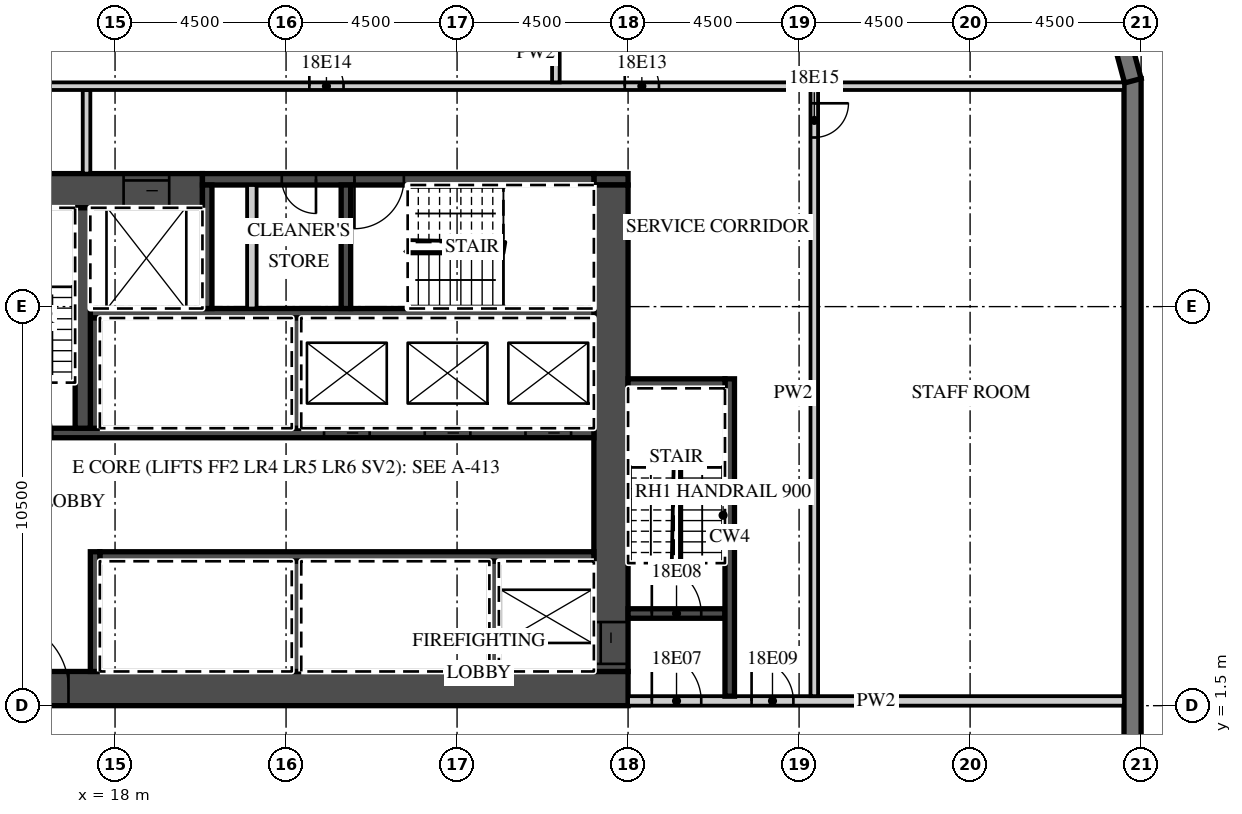
"""IFC4 building model, lengths in metres.
Left out: names, types, materials, properties, quantities, classifications, styles, units other than length and angle.
Written with IfcOpenShell. Run it as: python <this file> out.ifc"""

import sys

from ifc_helpers import new_model, si_unit, direction, frame, frame_2d, origin, place, context, subcontext, project, spatial, polyline, rectangle, outline, extrude, element, fill, save


model = new_model("IFC4")
c1 = context("Model", 3, precision=1e-05, world=origin(), true_north=direction((0.0, 1.0)))
c2 = subcontext(c1, "Body", "Model", "MODEL_VIEW")
j1 = project(units=[si_unit("LENGTHUNIT", "METRE"), si_unit("PLANEANGLEUNIT", "RADIAN")], contexts=[c1])
p1 = place(None, origin())
s1 = spatial("IfcSite", under=j1, at=p1, CompositionType="ELEMENT")
p2 = place(p1, origin())
s2 = spatial("IfcBuilding", under=s1, at=p2, CompositionType="ELEMENT")
p3 = place(p2, frame((0.0, 0.0, 89.7)))
s3 = spatial("IfcBuildingStorey", under=s2, at=p3, CompositionType="ELEMENT", Elevation=89.7)
p4 = place(p3, frame((44.775, -18.0, 0.0), z_axis=(0.0, 0.0, 1.0), x_axis=(0.0, 1.0, 0.0)))
e1 = element("IfcWall", 1, at=p4, inside=s3, PredefinedType="SOLIDWALL", context=c2, shape_type="SweptSolid", body=[
    extrude(rectangle(XDim=36.0, YDim=0.45, at=frame_2d((18.0, 0.0))), origin(), (0.0, 0.0, 1.0), 3.02),
])
p5 = place(p4, frame((3.9, 0.0, 0.45)))
e2 = element("IfcOpeningElement", 2, at=p5, cuts=e1, PredefinedType="OPENING", context=c2, shape_type="SweptSolid", body=[
    extrude(rectangle(XDim=3.3, YDim=2.25, at=frame_2d((1.65, 1.125))), frame((0.0, 0.235, 0.0), z_axis=(0.0, -1.0, 0.0), x_axis=(1.0, 0.0, 0.0)), (0.0, 0.0, 1.0), 0.47),
])
p6 = place(p4, frame((8.4, 0.0, 0.45)))
e3 = element("IfcOpeningElement", 3, at=p6, cuts=e1, PredefinedType="OPENING", context=c2, shape_type="SweptSolid", body=[
    extrude(rectangle(XDim=3.3, YDim=2.25, at=frame_2d((1.65, 1.125))), frame((0.0, 0.235, 0.0), z_axis=(0.0, -1.0, 0.0), x_axis=(1.0, 0.0, 0.0)), (0.0, 0.0, 1.0), 0.47),
])
p7 = place(p4, frame((12.9, 0.0, 0.45)))
e4 = element("IfcOpeningElement", 4, at=p7, cuts=e1, PredefinedType="OPENING", context=c2, shape_type="SweptSolid", body=[
    extrude(rectangle(XDim=3.3, YDim=2.25, at=frame_2d((1.65, 1.125))), frame((0.0, 0.235, 0.0), z_axis=(0.0, -1.0, 0.0), x_axis=(1.0, 0.0, 0.0)), (0.0, 0.0, 1.0), 0.47),
])
p8 = place(p3, frame((44.783, 17.942, 0.0), z_axis=(0.0, 0.0, 1.0), x_axis=(-0.25881466832, 0.965926999034, 0.0)))
e5 = element("IfcWall", 5, at=p8, inside=s3, PredefinedType="SOLIDWALL", context=c2, shape_type="SweptSolid", body=[
    extrude(outline(polyline([(0.0, -0.225), (2.071, -0.225), (1.95, 0.225), (0.121, 0.225), (0.0, -0.225)])), origin(), (0.0, 0.0, 1.0), 3.02),
])
p9 = place(p3, frame((13.5, 1.95, 0.0), z_axis=(0.0, 0.0, 1.0), x_axis=(1.0, 0.0, 0.0)))
e6 = element("IfcWall", 6, at=p9, inside=s3, PredefinedType="SHEAR", context=c2, shape_type="SweptSolid", body=[
    extrude(rectangle(XDim=18.0, YDim=0.9, at=frame_2d((9.0, 0.0))), origin(), (0.0, 0.0, 1.0), 3.02),
])
p10 = place(p9, frame((1.475, 0.0, 0.0)))
e7 = element("IfcOpeningElement", 7, at=p10, cuts=e6, PredefinedType="OPENING", context=c2, shape_type="SweptSolid", body=[
    extrude(rectangle(XDim=1.8, YDim=2.1, at=frame_2d((0.9, 1.05))), frame((0.0, 0.46, 0.0), z_axis=(0.0, -1.0, 0.0), x_axis=(1.0, 0.0, 0.0)), (0.0, 0.0, 1.0), 0.92),
])
p11 = place(p3, frame((13.5, 15.05, 0.0), z_axis=(0.0, 0.0, 1.0), x_axis=(1.0, 0.0, 0.0)))
e8 = element("IfcWall", 8, at=p11, inside=s3, PredefinedType="SHEAR", context=c2, shape_type="SweptSolid", body=[
    extrude(rectangle(XDim=6.8, YDim=0.9, at=frame_2d((3.4, 0.0))), origin(), (0.0, 0.0, 1.0), 3.02),
])
p12 = place(p11, frame((4.725, 0.0, 0.0)))
e9 = element("IfcOpeningElement", 9, at=p12, cuts=e8, PredefinedType="OPENING", context=c2, shape_type="SweptSolid", body=[
    extrude(rectangle(XDim=1.2, YDim=2.1, at=frame_2d((0.6, 1.05))), frame((0.0, 0.46, 0.0), z_axis=(0.0, -1.0, 0.0), x_axis=(1.0, 0.0, 0.0)), (0.0, 0.0, 1.0), 0.92),
])
p13 = place(p3, frame((30.6, 15.35, 0.0), z_axis=(0.0, 0.0, 1.0), x_axis=(1.0, 0.0, 0.0)))
e10 = element("IfcWall", 10, at=p13, inside=s3, PredefinedType="SHEAR", context=c2, shape_type="SweptSolid", body=[
    extrude(rectangle(XDim=0.9, YDim=0.3, at=frame_2d((0.45, 0.0))), origin(), (0.0, 0.0, 1.0), 3.02),
])
p14 = place(p3, frame((20.3, 15.35, 0.0), z_axis=(0.0, 0.0, 1.0), x_axis=(1.0, 0.0, 0.0)))
e11 = element("IfcWall", 11, at=p14, inside=s3, PredefinedType="SHEAR", context=c2, shape_type="SweptSolid", body=[
    extrude(rectangle(XDim=10.3, YDim=0.3, at=frame_2d((5.15, 0.0))), origin(), (0.0, 0.0, 1.0), 3.02),
])
p15 = place(p14, frame((4.0, 0.0, 0.0)))
e12 = element("IfcOpeningElement", 12, at=p15, cuts=e11, PredefinedType="OPENING", context=c2, shape_type="SweptSolid", body=[
    extrude(rectangle(XDim=1.3, YDim=2.1, at=frame_2d((0.65, 1.05))), frame((0.0, 0.16, 0.0), z_axis=(0.0, -1.0, 0.0), x_axis=(1.0, 0.0, 0.0)), (0.0, 0.0, 1.0), 0.32),
])
p16 = place(p14, frame((2.087, 0.0, 0.0)))
e13 = element("IfcOpeningElement", 13, at=p16, cuts=e11, PredefinedType="OPENING", context=c2, shape_type="SweptSolid", body=[
    extrude(rectangle(XDim=0.9, YDim=2.1, at=frame_2d((0.45, 1.05))), frame((0.0, 0.16, 0.0), z_axis=(0.0, -1.0, 0.0), x_axis=(1.0, 0.0, 0.0)), (0.0, 0.0, 1.0), 0.32),
])
p17 = place(p3, frame((31.05, 2.4, 0.0), z_axis=(0.0, 0.0, 1.0), x_axis=(0.0, 1.0, 0.0)))
e14 = element("IfcWall", 14, at=p17, inside=s3, PredefinedType="SHEAR", context=c2, shape_type="SweptSolid", body=[
    extrude(rectangle(XDim=12.8, YDim=0.9, at=frame_2d((6.4, 0.0))), origin(), (0.0, 0.0, 1.0), 3.02),
])
p18 = place(p17, frame((0.2, 0.0, 0.0)))
e15 = element("IfcOpeningElement", 15, at=p18, cuts=e14, PredefinedType="OPENING", context=c2, shape_type="SweptSolid", body=[
    extrude(rectangle(XDim=1.1, YDim=2.1, at=frame_2d((0.55, 1.05))), frame((0.0, 0.46, 0.0), z_axis=(0.0, -1.0, 0.0), x_axis=(1.0, 0.0, 0.0)), (0.0, 0.0, 1.0), 0.92),
])
p19 = place(p3, frame((17.6, 5.425, 0.0), z_axis=(0.0, 0.0, 1.0), x_axis=(1.0, 0.0, 0.0)))
e16 = element("IfcWall", 16, at=p19, inside=s3, PredefinedType="SHEAR", context=c2, shape_type="SweptSolid", body=[
    extrude(rectangle(XDim=13.0, YDim=0.25, at=frame_2d((6.5, 0.0))), origin(), (0.0, 0.0, 1.0), 3.02),
])
p20 = place(p3, frame((17.475, 2.4, 0.0), z_axis=(0.0, 0.0, 1.0), x_axis=(0.0, 1.0, 0.0)))
e17 = element("IfcWall", 17, at=p20, inside=s3, PredefinedType="SHEAR", context=c2, shape_type="SweptSolid", body=[
    extrude(rectangle(XDim=3.15, YDim=0.25, at=frame_2d((1.575, 0.0))), origin(), (0.0, 0.0, 1.0), 3.02),
])
for number, where, z_axis, x_axis in (
    (18, (27.975, 2.4, 0.0), (0.0, 0.0, 1.0), (0.0, 1.0, 0.0)),
    (19, (22.775, 2.4, 0.0), (0.0, 0.0, 1.0), (0.0, 1.0, 0.0)),
):
    element("IfcWall", number, at=place(p3, frame(where, z_axis=z_axis, x_axis=x_axis)), inside=s3, PredefinedType="SHEAR", context=c2, shape_type="SweptSolid", body=[
        extrude(rectangle(XDim=2.9, YDim=0.25, at=frame_2d((1.45, 0.0))), origin(), (0.0, 0.0, 1.0), 3.02),
    ])
p21 = place(p3, frame((14.4, 8.675, 0.0), z_axis=(0.0, 0.0, 1.0), x_axis=(1.0, 0.0, 0.0)))
e20 = element("IfcWall", 20, at=p21, inside=s3, PredefinedType="SHEAR", context=c2, shape_type="SweptSolid", body=[
    extrude(rectangle(XDim=16.2, YDim=0.25, at=frame_2d((8.1, 0.0))), origin(), (0.0, 0.0, 1.0), 3.02),
])
p22 = place(p21, frame((14.4, 0.0, 0.0)))
e21 = element("IfcOpeningElement", 21, at=p22, cuts=e20, PredefinedType="OPENING", context=c2, shape_type="SweptSolid", body=[
    extrude(rectangle(XDim=1.2, YDim=2.1, at=frame_2d((0.6, 1.05))), frame((0.0, 0.135, 0.0), z_axis=(0.0, -1.0, 0.0), x_axis=(1.0, 0.0, 0.0)), (0.0, 0.0, 1.0), 0.27),
])
p23 = place(p21, frame((11.75, 0.0, 0.0)))
e22 = element("IfcOpeningElement", 22, at=p23, cuts=e20, PredefinedType="OPENING", context=c2, shape_type="SweptSolid", body=[
    extrude(rectangle(XDim=1.2, YDim=2.1, at=frame_2d((0.6, 1.05))), frame((0.0, 0.135, 0.0), z_axis=(0.0, -1.0, 0.0), x_axis=(1.0, 0.0, 0.0)), (0.0, 0.0, 1.0), 0.27),
])
p24 = place(p21, frame((9.1, 0.0, 0.0)))
e23 = element("IfcOpeningElement", 23, at=p24, cuts=e20, PredefinedType="OPENING", context=c2, shape_type="SweptSolid", body=[
    extrude(rectangle(XDim=1.2, YDim=2.1, at=frame_2d((0.6, 1.05))), frame((0.0, 0.135, 0.0), z_axis=(0.0, -1.0, 0.0), x_axis=(1.0, 0.0, 0.0)), (0.0, 0.0, 1.0), 0.27),
])
p25 = place(p21, frame((0.65, 0.0, 0.0)))
e24 = element("IfcOpeningElement", 24, at=p25, cuts=e20, PredefinedType="OPENING", context=c2, shape_type="SweptSolid", body=[
    extrude(rectangle(XDim=1.3, YDim=2.1, at=frame_2d((0.65, 1.05))), frame((0.0, 0.135, 0.0), z_axis=(0.0, -1.0, 0.0), x_axis=(1.0, 0.0, 0.0)), (0.0, 0.0, 1.0), 0.27),
])
p26 = place(p3, frame((17.35, 11.825, 0.0), z_axis=(0.0, 0.0, 1.0), x_axis=(1.0, 0.0, 0.0)))
e25 = element("IfcWall", 25, at=p26, inside=s3, PredefinedType="SHEAR", context=c2, shape_type="SweptSolid", body=[
    extrude(rectangle(XDim=13.25, YDim=0.25, at=frame_2d((6.625, 0.0))), origin(), (0.0, 0.0, 1.0), 3.02),
])
for number, where, z_axis, x_axis in (
    (26, (17.475, 8.8, 0.0), (0.0, 0.0, 1.0), (0.0, 1.0, 0.0)),
    (27, (22.775, 8.8, 0.0), (0.0, 0.0, 1.0), (0.0, 1.0, 0.0)),
):
    element("IfcWall", number, at=place(p3, frame(where, z_axis=z_axis, x_axis=x_axis)), inside=s3, PredefinedType="SHEAR", context=c2, shape_type="SweptSolid", body=[
        extrude(rectangle(XDim=2.9, YDim=0.25, at=frame_2d((1.45, 0.0))), origin(), (0.0, 0.0, 1.0), 3.02),
    ])
p27 = place(p3, frame((17.15, 8.8, 0.0), z_axis=(0.0, 0.0, 1.0), x_axis=(0.0, 1.0, 0.0)))
e28 = element("IfcWall", 28, at=p27, inside=s3, PredefinedType="SHEAR", context=c2, shape_type="SweptSolid", body=[
    extrude(rectangle(XDim=5.8, YDim=0.4, at=frame_2d((2.9, 0.0))), origin(), (0.0, 0.0, 1.0), 3.02),
])
for number, where, z_axis, x_axis in (
    (29, (20.425, 11.95, 0.0), (0.0, 0.0, 1.0), (0.0, 1.0, 0.0)),
    (30, (24.075, 11.95, 0.0), (0.0, 0.0, 1.0), (0.0, 1.0, 0.0)),
):
    element("IfcWall", number, at=place(p3, frame(where, z_axis=z_axis, x_axis=x_axis)), inside=s3, PredefinedType="SHEAR", context=c2, shape_type="SweptSolid", body=[
        extrude(rectangle(XDim=3.25, YDim=0.25, at=frame_2d((1.625, 0.0))), origin(), (0.0, 0.0, 1.0), 3.02),
    ])
p28 = place(p3, frame((21.6, 11.95, 0.0), z_axis=(0.0, 0.0, 1.0), x_axis=(0.0, 1.0, 0.0)))
e31 = element("IfcWall", 31, at=p28, inside=s3, PredefinedType="PARTITIONING", context=c2, shape_type="SweptSolid", body=[
    extrude(rectangle(XDim=3.25, YDim=0.25, at=frame_2d((1.625, 0.0))), origin(), (0.0, 0.0, 1.0), 3.02),
])
p29 = place(p3, frame((31.5, 1.625, 0.0), z_axis=(0.0, 0.0, 1.0), x_axis=(1.0, 0.0, 0.0)))
e32 = element("IfcWall", 32, at=p29, inside=s3, PredefinedType="PARTITIONING", context=c2, shape_type="SweptSolid", body=[
    extrude(rectangle(XDim=13.05, YDim=0.25, at=frame_2d((6.525, 0.0))), origin(), (0.0, 0.0, 1.0), 3.02),
])
p30 = place(p29, frame((0.625, 0.0, 0.0)))
e33 = element("IfcOpeningElement", 33, at=p30, cuts=e32, PredefinedType="OPENING", context=c2, shape_type="SweptSolid", body=[
    extrude(rectangle(XDim=1.3, YDim=2.1, at=frame_2d((0.65, 1.05))), frame((0.0, 0.135, 0.0), z_axis=(0.0, -1.0, 0.0), x_axis=(1.0, 0.0, 0.0)), (0.0, 0.0, 1.0), 0.27),
])
p31 = place(p29, frame((3.25, 0.0, 0.0)))
e34 = element("IfcOpeningElement", 34, at=p31, cuts=e32, PredefinedType="OPENING", context=c2, shape_type="SweptSolid", body=[
    extrude(rectangle(XDim=1.1, YDim=2.1, at=frame_2d((0.55, 1.05))), frame((0.0, 0.135, 0.0), z_axis=(0.0, -1.0, 0.0), x_axis=(1.0, 0.0, 0.0)), (0.0, 0.0, 1.0), 0.27),
])
p32 = place(p3, frame((31.5, 3.925, 0.0), z_axis=(0.0, 0.0, 1.0), x_axis=(1.0, 0.0, 0.0)))
e35 = element("IfcWall", 35, at=p32, inside=s3, PredefinedType="SHEAR", context=c2, shape_type="SweptSolid", body=[
    extrude(rectangle(XDim=2.55, YDim=0.25, at=frame_2d((1.275, 0.0))), origin(), (0.0, 0.0, 1.0), 3.02),
])
p33 = place(p32, frame((0.625, 0.0, 0.0)))
e36 = element("IfcOpeningElement", 36, at=p33, cuts=e35, PredefinedType="OPENING", context=c2, shape_type="SweptSolid", body=[
    extrude(rectangle(XDim=1.3, YDim=2.1, at=frame_2d((0.65, 1.05))), frame((0.0, 0.135, 0.0), z_axis=(0.0, -1.0, 0.0), x_axis=(1.0, 0.0, 0.0)), (0.0, 0.0, 1.0), 0.27),
])
p34 = place(p3, frame((34.175, 1.75, 0.0), z_axis=(0.0, 0.0, 1.0), x_axis=(0.0, 1.0, 0.0)))
e37 = element("IfcWall", 37, at=p34, inside=s3, PredefinedType="SHEAR", context=c2, shape_type="SweptSolid", body=[
    extrude(rectangle(XDim=8.35, YDim=0.25, at=frame_2d((4.175, 0.0))), origin(), (0.0, 0.0, 1.0), 3.02),
])
p35 = place(p3, frame((31.5, 9.975, 0.0), z_axis=(0.0, 0.0, 1.0), x_axis=(1.0, 0.0, 0.0)))
e38 = element("IfcWall", 38, at=p35, inside=s3, PredefinedType="SHEAR", context=c2, shape_type="SweptSolid", body=[
    extrude(rectangle(XDim=2.55, YDim=0.25, at=frame_2d((1.275, 0.0))), origin(), (0.0, 0.0, 1.0), 3.02),
])
p36 = place(p3, frame((17.25, 15.5, 0.0), z_axis=(0.0, 0.0, 1.0), x_axis=(0.0, 1.0, 0.0)))
e39 = element("IfcWall", 39, at=p36, inside=s3, PredefinedType="PARTITIONING", context=c2, shape_type="SweptSolid", body=[
    extrude(rectangle(XDim=2.2, YDim=0.2, at=frame_2d((1.1, 0.0))), origin(), (0.0, 0.0, 1.0), 3.02),
])
p37 = place(p3, frame((36.4, 1.75, 0.0), z_axis=(0.0, 0.0, 1.0), x_axis=(0.0, 1.0, 0.0)))
e40 = element("IfcWall", 40, at=p37, inside=s3, PredefinedType="PARTITIONING", context=c2, shape_type="SweptSolid", body=[
    extrude(rectangle(XDim=15.95, YDim=0.2, at=frame_2d((7.975, 0.0))), origin(), (0.0, 0.0, 1.0), 3.02),
])
p38 = place(p37, frame((14.7, 0.0, 0.0)))
e41 = element("IfcOpeningElement", 41, at=p38, cuts=e40, PredefinedType="OPENING", context=c2, shape_type="SweptSolid", body=[
    extrude(rectangle(XDim=0.9, YDim=2.1, at=frame_2d((0.45, 1.05))), frame((0.0, 0.11, 0.0), z_axis=(0.0, -1.0, 0.0), x_axis=(1.0, 0.0, 0.0)), (0.0, 0.0, 1.0), 0.22),
])
p39 = place(p3, frame((13.6, 17.8, 0.0), z_axis=(0.0, 0.0, 1.0), x_axis=(1.0, 0.0, 0.0)))
e42 = element("IfcWall", 42, at=p39, inside=s3, PredefinedType="PARTITIONING", context=c2, shape_type="SweptSolid", body=[
    extrude(rectangle(XDim=30.95, YDim=0.2, at=frame_2d((15.475, 0.0))), origin(), (0.0, 0.0, 1.0), 3.02),
])
p40 = place(p39, frame((17.812, 0.0, 0.0)))
e43 = element("IfcOpeningElement", 43, at=p40, cuts=e42, PredefinedType="OPENING", context=c2, shape_type="SweptSolid", body=[
    extrude(rectangle(XDim=0.9, YDim=2.1, at=frame_2d((0.45, 1.05))), frame((0.0, 0.11, 0.0), z_axis=(0.0, -1.0, 0.0), x_axis=(1.0, 0.0, 0.0)), (0.0, 0.0, 1.0), 0.22),
])
p41 = place(p39, frame((9.512, 0.0, 0.0)))
e44 = element("IfcOpeningElement", 44, at=p41, cuts=e42, PredefinedType="OPENING", context=c2, shape_type="SweptSolid", body=[
    extrude(rectangle(XDim=0.9, YDim=2.1, at=frame_2d((0.45, 1.05))), frame((0.0, 0.11, 0.0), z_axis=(0.0, -1.0, 0.0), x_axis=(1.0, 0.0, 0.0)), (0.0, 0.0, 1.0), 0.22),
])
p42 = place(p3, frame((29.6, 17.9, 0.0), z_axis=(0.0, 0.0, 1.0), x_axis=(0.0, 1.0, 0.0)))
e45 = element("IfcWall", 45, at=p42, inside=s3, PredefinedType="PARTITIONING", context=c2, shape_type="SweptSolid", body=[
    extrude(rectangle(XDim=3.65, YDim=0.2, at=frame_2d((1.825, 0.0))), origin(), (0.0, 0.0, 1.0), 3.02),
])
p43 = place(p22, origin())
e46 = element("IfcDoor", 46, at=p43, inside=s3, OperationType="SLIDING_TO_LEFT", PredefinedType="DOOR", context=c2, shape_type="SweptSolid", body=[
    extrude(rectangle(XDim=1.2, YDim=2.1, at=frame_2d((0.6, 1.05))), frame((0.0, 0.025, 0.0), z_axis=(0.0, -1.0, 0.0), x_axis=(1.0, 0.0, 0.0)), (0.0, 0.0, 1.0), 0.05),
])
fill(e21, e46)
p44 = place(p23, origin())
e47 = element("IfcDoor", 47, at=p44, inside=s3, OperationType="SLIDING_TO_RIGHT", PredefinedType="DOOR", context=c2, shape_type="SweptSolid", body=[
    extrude(rectangle(XDim=1.2, YDim=2.1, at=frame_2d((0.6, 1.05))), frame((0.0, 0.025, 0.0), z_axis=(0.0, -1.0, 0.0), x_axis=(1.0, 0.0, 0.0)), (0.0, 0.0, 1.0), 0.05),
])
fill(e22, e47)
p45 = place(p24, origin())
e48 = element("IfcDoor", 48, at=p45, inside=s3, OperationType="SLIDING_TO_RIGHT", PredefinedType="DOOR", context=c2, shape_type="SweptSolid", body=[
    extrude(rectangle(XDim=1.2, YDim=2.1, at=frame_2d((0.6, 1.05))), frame((0.0, 0.025, 0.0), z_axis=(0.0, -1.0, 0.0), x_axis=(1.0, 0.0, 0.0)), (0.0, 0.0, 1.0), 0.05),
])
fill(e23, e48)
p46 = place(p12, origin())
e49 = element("IfcDoor", 49, at=p46, inside=s3, OperationType="SLIDING_TO_LEFT", PredefinedType="DOOR", context=c2, shape_type="SweptSolid", body=[
    extrude(rectangle(XDim=1.2, YDim=2.1, at=frame_2d((0.6, 1.05))), frame((0.0, 0.025, 0.0), z_axis=(0.0, -1.0, 0.0), x_axis=(1.0, 0.0, 0.0)), (0.0, 0.0, 1.0), 0.05),
])
fill(e9, e49)
p47 = place(p18, origin())
e50 = element("IfcDoor", 50, at=p47, inside=s3, OperationType="SLIDING_TO_LEFT", PredefinedType="DOOR", context=c2, shape_type="SweptSolid", body=[
    extrude(rectangle(XDim=1.1, YDim=2.1, at=frame_2d((0.55, 1.05))), frame((0.0, 0.025, 0.0), z_axis=(0.0, -1.0, 0.0), x_axis=(1.0, 0.0, 0.0)), (0.0, 0.0, 1.0), 0.05),
])
fill(e15, e50)
p48 = place(p10, origin())
e51 = element("IfcDoor", 51, at=p48, inside=s3, OperationType="DOUBLE_DOOR_DOUBLE_SWING", PredefinedType="DOOR", context=c2, shape_type="SweptSolid", body=[
    extrude(rectangle(XDim=1.8, YDim=2.1, at=frame_2d((0.9, 1.05))), frame((0.0, 0.025, 0.0), z_axis=(0.0, -1.0, 0.0), x_axis=(1.0, 0.0, 0.0)), (0.0, 0.0, 1.0), 0.05),
])
fill(e7, e51)
p49 = place(p30, origin())
e52 = element("IfcDoor", 52, at=p49, inside=s3, OperationType="SINGLE_SWING_LEFT", PredefinedType="DOOR", context=c2, shape_type="SweptSolid", body=[
    extrude(rectangle(XDim=1.3, YDim=2.1, at=frame_2d((0.65, 1.05))), frame((0.0, 0.025, 0.0), z_axis=(0.0, -1.0, 0.0), x_axis=(1.0, 0.0, 0.0)), (0.0, 0.0, 1.0), 0.05),
])
fill(e33, e52)
p50 = place(p33, origin())
e53 = element("IfcDoor", 53, at=p50, inside=s3, OperationType="SINGLE_SWING_LEFT", PredefinedType="DOOR", context=c2, shape_type="SweptSolid", body=[
    extrude(rectangle(XDim=1.3, YDim=2.1, at=frame_2d((0.65, 1.05))), frame((0.0, 0.025, 0.0), z_axis=(0.0, -1.0, 0.0), x_axis=(1.0, 0.0, 0.0)), (0.0, 0.0, 1.0), 0.05),
])
fill(e36, e53)
p51 = place(p31, origin())
e54 = element("IfcDoor", 54, at=p51, inside=s3, OperationType="SINGLE_SWING_LEFT", PredefinedType="DOOR", context=c2, shape_type="SweptSolid", body=[
    extrude(rectangle(XDim=1.1, YDim=2.1, at=frame_2d((0.55, 1.05))), frame((0.0, 0.025, 0.0), z_axis=(0.0, -1.0, 0.0), x_axis=(1.0, 0.0, 0.0)), (0.0, 0.0, 1.0), 0.05),
])
fill(e34, e54)
p52 = place(p15, origin())
e55 = element("IfcDoor", 55, at=p52, inside=s3, OperationType="SINGLE_SWING_LEFT", PredefinedType="DOOR", context=c2, shape_type="SweptSolid", body=[
    extrude(rectangle(XDim=1.3, YDim=2.1, at=frame_2d((0.65, 1.05))), frame((0.0, 0.025, 0.0), z_axis=(0.0, -1.0, 0.0), x_axis=(1.0, 0.0, 0.0)), (0.0, 0.0, 1.0), 0.05),
])
fill(e12, e55)
p53 = place(p16, origin())
e56 = element("IfcDoor", 56, at=p53, inside=s3, OperationType="SINGLE_SWING_RIGHT", PredefinedType="DOOR", context=c2, shape_type="SweptSolid", body=[
    extrude(rectangle(XDim=0.9, YDim=2.1, at=frame_2d((0.45, 1.05))), frame((0.0, 0.025, 0.0), z_axis=(0.0, -1.0, 0.0), x_axis=(1.0, 0.0, 0.0)), (0.0, 0.0, 1.0), 0.05),
])
fill(e13, e56)
p54 = place(p40, origin())
e57 = element("IfcDoor", 57, at=p54, inside=s3, OperationType="SINGLE_SWING_LEFT", PredefinedType="DOOR", context=c2, shape_type="SweptSolid", body=[
    extrude(rectangle(XDim=0.9, YDim=2.1, at=frame_2d((0.45, 1.05))), frame((0.0, 0.025, 0.0), z_axis=(0.0, -1.0, 0.0), x_axis=(1.0, 0.0, 0.0)), (0.0, 0.0, 1.0), 0.05),
])
fill(e43, e57)
p55 = place(p41, origin())
e58 = element("IfcDoor", 58, at=p55, inside=s3, OperationType="SINGLE_SWING_LEFT", PredefinedType="DOOR", context=c2, shape_type="SweptSolid", body=[
    extrude(rectangle(XDim=0.9, YDim=2.1, at=frame_2d((0.45, 1.05))), frame((0.0, 0.025, 0.0), z_axis=(0.0, -1.0, 0.0), x_axis=(1.0, 0.0, 0.0)), (0.0, 0.0, 1.0), 0.05),
])
fill(e44, e58)
p56 = place(p38, origin())
e59 = element("IfcDoor", 59, at=p56, inside=s3, OperationType="SINGLE_SWING_RIGHT", PredefinedType="DOOR", context=c2, shape_type="SweptSolid", body=[
    extrude(rectangle(XDim=0.9, YDim=2.1, at=frame_2d((0.45, 1.05))), frame((0.0, 0.025, 0.0), z_axis=(0.0, -1.0, 0.0), x_axis=(1.0, 0.0, 0.0)), (0.0, 0.0, 1.0), 0.05),
])
fill(e41, e59)
save(model, sys.argv[1])
